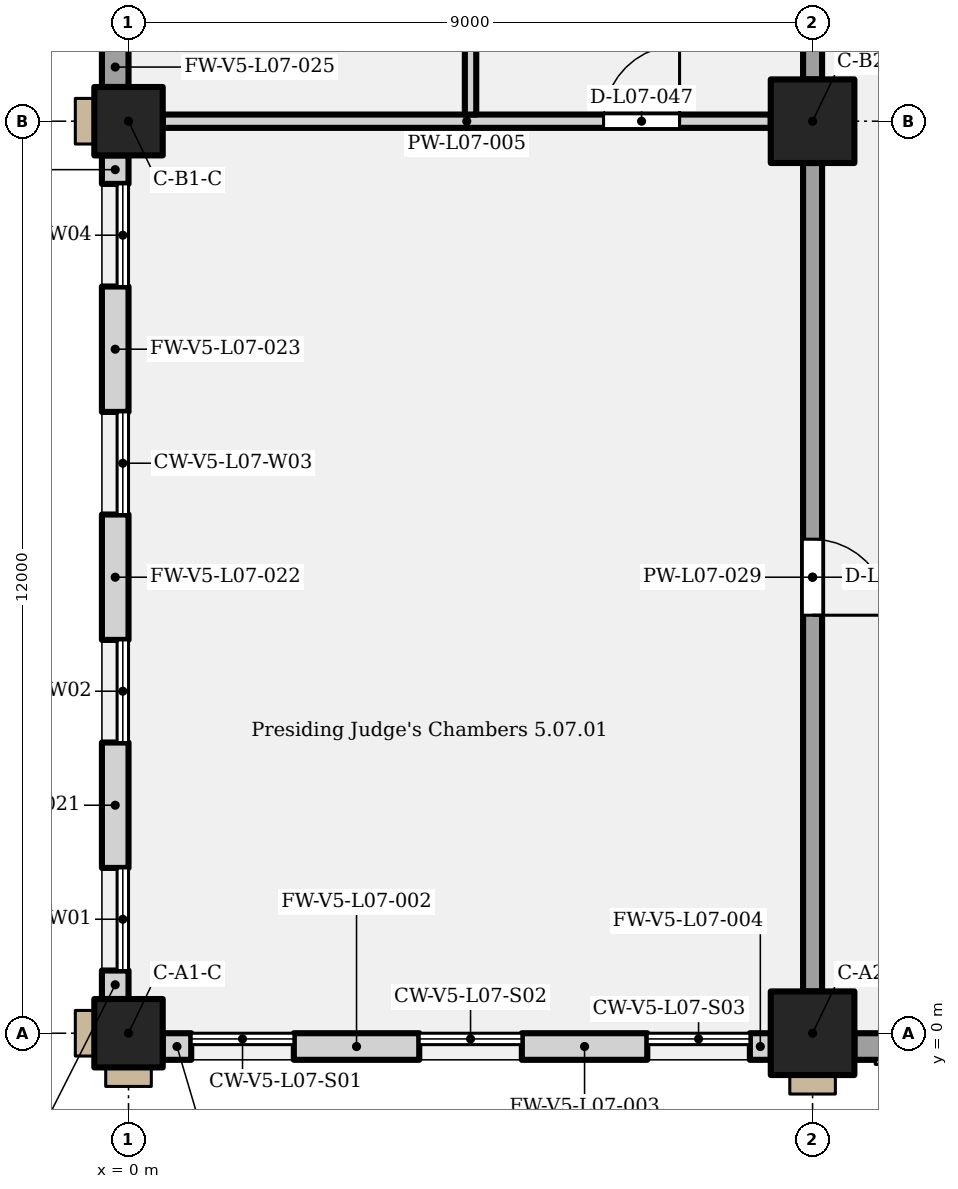
"""IFC4 building model, lengths in metres.
Left out: names, types, materials, properties, quantities, classifications, styles, units other than length and angle.
Written with IfcOpenShell. Run it as: python <this file> out.ifc"""

import sys

from ifc_helpers import new_model, si_unit, direction, frame, frame_2d, origin, origin_with_axes, origin_2d, place, context, subcontext, project, spatial, rectangle, extrude, element, fill, save


model = new_model("IFC4")
c1 = context("Model", 3, precision=1e-05, world=origin(), true_north=direction((0.0, 1.0)))
c2 = subcontext(c1, "Body", "Model", "MODEL_VIEW")
j1 = project(units=[si_unit("LENGTHUNIT", "METRE"), si_unit("PLANEANGLEUNIT", "RADIAN")], contexts=[c1])
p1 = place(None, origin())
s1 = spatial("IfcSite", under=j1, at=p1, CompositionType="ELEMENT")
p2 = place(p1, origin())
s2 = spatial("IfcBuilding", under=s1, at=p2, CompositionType="ELEMENT")
p3 = place(p2, frame((0.0, 0.0, 39.0)))
s3 = spatial("IfcBuildingStorey", under=s2, at=p3, CompositionType="ELEMENT", Elevation=39.0)
p4 = place(p3, origin_with_axes())
e1 = element("IfcColumn", 1, at=p4, inside=s3, PredefinedType="COLUMN", context=c2, shape_type="SweptSolid", body=[
    extrude(rectangle(XDim=0.9, YDim=0.9, at=origin_2d()), origin(), (0.0, 0.0, 1.0), 5.4),
])
p5 = place(p3, frame((9.0, 0.0, 0.0), z_axis=(0.0, 0.0, 1.0), x_axis=(1.0, 0.0, 0.0)))
e2 = element("IfcColumn", 2, at=p5, inside=s3, PredefinedType="COLUMN", context=c2, shape_type="SweptSolid", body=[
    extrude(rectangle(XDim=1.1, YDim=1.1, at=origin_2d()), origin(), (0.0, 0.0, 1.0), 5.4),
])
p6 = place(p3, frame((0.0, 12.0, 0.0), z_axis=(0.0, 0.0, 1.0), x_axis=(1.0, 0.0, 0.0)))
e3 = element("IfcColumn", 3, at=p6, inside=s3, PredefinedType="COLUMN", context=c2, shape_type="SweptSolid", body=[
    extrude(rectangle(XDim=0.9, YDim=0.9, at=origin_2d()), origin(), (0.0, 0.0, 1.0), 5.4),
])
p7 = place(p3, frame((9.0, 12.0, 0.0), z_axis=(0.0, 0.0, 1.0), x_axis=(1.0, 0.0, 0.0)))
e4 = element("IfcColumn", 4, at=p7, inside=s3, PredefinedType="COLUMN", context=c2, shape_type="SweptSolid", body=[
    extrude(rectangle(XDim=1.1, YDim=1.1, at=origin_2d()), origin(), (0.0, 0.0, 1.0), 5.4),
])
p8 = place(p3, frame((0.45, -0.175, 0.0), z_axis=(0.0, 0.0, 1.0), x_axis=(1.0, 0.0, 0.0)))
e5 = element("IfcWall", 5, at=p8, inside=s3, PredefinedType="SOLIDWALL", context=c2, shape_type="SweptSolid", body=[
    extrude(rectangle(XDim=0.375, YDim=0.35, at=frame_2d((0.188, 0.0))), origin(), (0.0, 0.0, 1.0), 5.15),
])
for number, where, z_axis, x_axis in (
    (6, (2.175, -0.175, 0.0), (0.0, 0.0, 1.0), (1.0, 0.0, 0.0)),
    (7, (5.175, -0.175, 0.0), (0.0, 0.0, 1.0), (1.0, 0.0, 0.0)),
):
    element("IfcWall", number, at=place(p3, frame(where, z_axis=z_axis, x_axis=x_axis)), inside=s3, PredefinedType="SOLIDWALL", context=c2, shape_type="SweptSolid", body=[
        extrude(rectangle(XDim=1.65, YDim=0.35, at=frame_2d((0.825, 0.0))), origin(), (0.0, 0.0, 1.0), 5.15),
    ])
p9 = place(p3, frame((8.175, -0.175, 0.0), z_axis=(0.0, 0.0, 1.0), x_axis=(1.0, 0.0, 0.0)))
e8 = element("IfcWall", 8, at=p9, inside=s3, PredefinedType="SOLIDWALL", context=c2, shape_type="SweptSolid", body=[
    extrude(rectangle(XDim=0.275, YDim=0.35, at=frame_2d((0.137, 0.0))), origin(), (0.0, 0.0, 1.0), 5.15),
])
p10 = place(p3, frame((9.55, -0.175, 0.0), z_axis=(0.0, 0.0, 1.0), x_axis=(1.0, 0.0, 0.0)))
e9 = element("IfcWall", 9, at=p10, inside=s3, PredefinedType="SOLIDWALL", context=c2, shape_type="SweptSolid", body=[
    extrude(rectangle(XDim=7.9, YDim=0.35, at=frame_2d((3.95, 0.0))), origin(), (0.0, 0.0, 1.0), 5.15),
])
p11 = place(p3, frame((-0.175, 0.45, 0.0), z_axis=(0.0, 0.0, 1.0), x_axis=(0.0, 1.0, 0.0)))
e10 = element("IfcWall", 10, at=p11, inside=s3, PredefinedType="SOLIDWALL", context=c2, shape_type="SweptSolid", body=[
    extrude(rectangle(XDim=0.375, YDim=0.35, at=frame_2d((0.188, 0.0))), origin(), (0.0, 0.0, 1.0), 5.15),
])
for number, where, z_axis, x_axis in (
    (11, (-0.175, 2.175, 0.0), (0.0, 0.0, 1.0), (0.0, 1.0, 0.0)),
    (12, (-0.175, 5.175, 0.0), (0.0, 0.0, 1.0), (0.0, 1.0, 0.0)),
    (13, (-0.175, 8.175, 0.0), (0.0, 0.0, 1.0), (0.0, 1.0, 0.0)),
):
    element("IfcWall", number, at=place(p3, frame(where, z_axis=z_axis, x_axis=x_axis)), inside=s3, PredefinedType="SOLIDWALL", context=c2, shape_type="SweptSolid", body=[
        extrude(rectangle(XDim=1.65, YDim=0.35, at=frame_2d((0.825, 0.0))), origin(), (0.0, 0.0, 1.0), 5.15),
    ])
p12 = place(p3, frame((-0.175, 11.175, 0.0), z_axis=(0.0, 0.0, 1.0), x_axis=(0.0, 1.0, 0.0)))
e14 = element("IfcWall", 14, at=p12, inside=s3, PredefinedType="SOLIDWALL", context=c2, shape_type="SweptSolid", body=[
    extrude(rectangle(XDim=0.375, YDim=0.35, at=frame_2d((0.188, 0.0))), origin(), (0.0, 0.0, 1.0), 5.15),
])
p13 = place(p3, frame((-0.175, 12.45, 0.0), z_axis=(0.0, 0.0, 1.0), x_axis=(0.0, 1.0, 0.0)))
e15 = element("IfcWall", 15, at=p13, inside=s3, PredefinedType="SOLIDWALL", context=c2, shape_type="SweptSolid", body=[
    extrude(rectangle(XDim=0.525, YDim=0.35, at=frame_2d((0.263, 0.0))), origin(), (0.0, 0.0, 1.0), 5.15),
])
p14 = place(p3, frame((0.45, 12.0, 0.0), z_axis=(0.0, 0.0, 1.0), x_axis=(1.0, 0.0, 0.0)))
e16 = element("IfcWall", 16, at=p14, inside=s3, PredefinedType="PARTITIONING", context=c2, shape_type="SweptSolid", body=[
    extrude(rectangle(XDim=8.0, YDim=0.175, at=frame_2d((4.0, 0.0))), origin(), (0.0, 0.0, 1.0), 4.4),
])
p15 = place(p14, frame((5.8, 0.0, 0.0)))
e17 = element("IfcOpeningElement", 17, at=p15, cuts=e16, PredefinedType="OPENING", context=c2, shape_type="SweptSolid", body=[
    extrude(rectangle(XDim=1.0, YDim=2.1, at=frame_2d((0.5, 1.05))), frame((0.0, 0.097, 0.0), z_axis=(0.0, -1.0, 0.0), x_axis=(1.0, 0.0, 0.0)), (0.0, 0.0, 1.0), 0.195),
])
p16 = place(p3, frame((4.5, 12.087, 0.0), z_axis=(0.0, 0.0, 1.0), x_axis=(0.0, 1.0, 0.0)))
e18 = element("IfcWall", 18, at=p16, inside=s3, PredefinedType="PARTITIONING", context=c2, shape_type="SweptSolid", body=[
    extrude(rectangle(XDim=4.938, YDim=0.15, at=frame_2d((2.469, 0.0))), origin(), (0.0, 0.0, 1.0), 5.15),
])
p17 = place(p3, frame((9.0, 0.55, 0.0), z_axis=(0.0, 0.0, 1.0), x_axis=(0.0, 1.0, 0.0)))
e19 = element("IfcWall", 19, at=p17, inside=s3, PredefinedType="PARTITIONING", context=c2, shape_type="SweptSolid", body=[
    extrude(rectangle(XDim=10.9, YDim=0.25, at=frame_2d((5.45, 0.0))), origin(), (0.0, 0.0, 1.0), 4.4),
])
p18 = place(p17, frame((5.95, 0.0, 0.0), z_axis=(0.0, 0.0, 1.0), x_axis=(-1.0, 0.0, 0.0)))
e20 = element("IfcOpeningElement", 20, at=p18, cuts=e19, PredefinedType="OPENING", context=c2, shape_type="SweptSolid", body=[
    extrude(rectangle(XDim=1.0, YDim=2.1, at=frame_2d((0.5, 1.05))), frame((0.0, 0.135, 0.0), z_axis=(0.0, -1.0, 0.0), x_axis=(1.0, 0.0, 0.0)), (0.0, 0.0, 1.0), 0.27),
])
p19 = place(p3, frame((9.0, 12.55, 0.0), z_axis=(0.0, 0.0, 1.0), x_axis=(0.0, 1.0, 0.0)))
e21 = element("IfcWall", 21, at=p19, inside=s3, PredefinedType="PARTITIONING", context=c2, shape_type="SweptSolid", body=[
    extrude(rectangle(XDim=4.475, YDim=0.25, at=frame_2d((2.237, 0.0))), origin(), (0.0, 0.0, 1.0), 4.2),
])
p20 = place(p15, origin())
e22 = element("IfcDoor", 22, at=p20, inside=s3, OperationType="SINGLE_SWING_RIGHT", PredefinedType="DOOR", context=c2, shape_type="SweptSolid", body=[
    extrude(rectangle(XDim=1.0, YDim=2.1, at=frame_2d((0.5, 1.05))), frame((0.0, 0.025, 0.0), z_axis=(0.0, -1.0, 0.0), x_axis=(1.0, 0.0, 0.0)), (0.0, 0.0, 1.0), 0.05),
])
fill(e17, e22)
p21 = place(p18, origin())
e23 = element("IfcDoor", 23, at=p21, inside=s3, OperationType="SINGLE_SWING_RIGHT", PredefinedType="DOOR", context=c2, shape_type="SweptSolid", body=[
    extrude(rectangle(XDim=1.0, YDim=2.1, at=frame_2d((0.5, 1.05))), frame((0.0, 0.025, 0.0), z_axis=(0.0, -1.0, 0.0), x_axis=(1.0, 0.0, 0.0)), (0.0, 0.0, 1.0), 0.05),
])
fill(e20, e23)
save(model, sys.argv[1])
